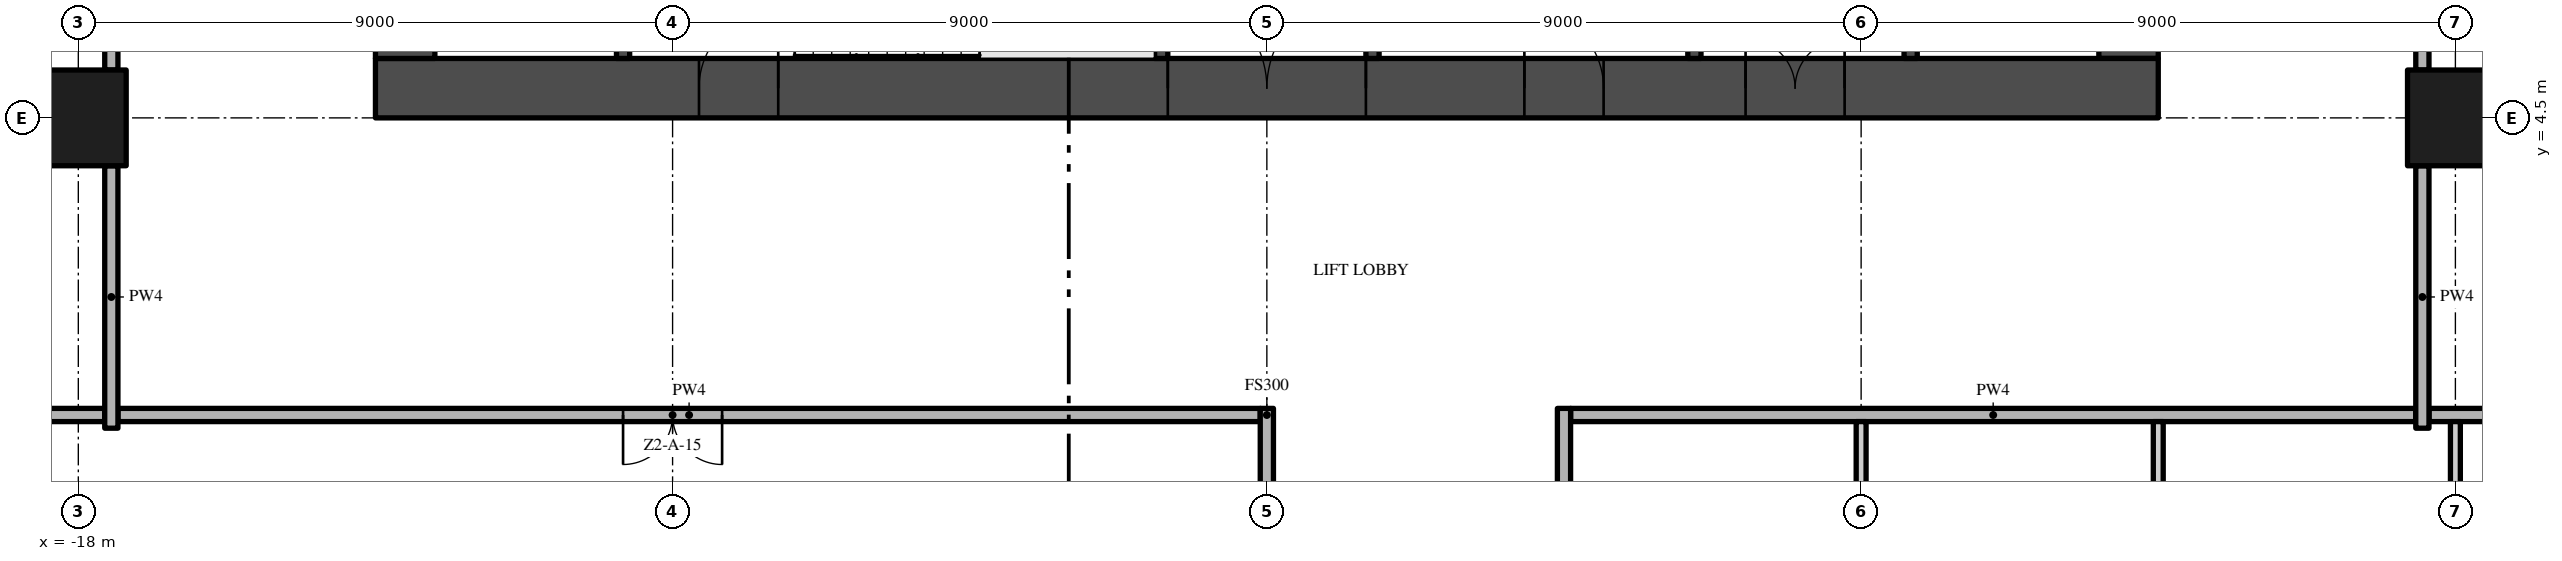
"""IFC4 building model, lengths in metres.
Left out: names, types, materials, properties, quantities, classifications, styles, units other than length and angle.
Written with IfcOpenShell. Run it as: python <this file> out.ifc"""

import sys

from ifc_helpers import new_model, si_unit, direction, frame, frame_2d, origin, origin_2d, place, context, subcontext, project, spatial, rectangle, extrude, element, fill, save


model = new_model("IFC4")
c1 = context("Model", 3, precision=1e-05, world=origin(), true_north=direction((0.0, 1.0)))
c2 = subcontext(c1, "Body", "Model", "MODEL_VIEW")
j1 = project(units=[si_unit("LENGTHUNIT", "METRE"), si_unit("PLANEANGLEUNIT", "RADIAN")], contexts=[c1])
p1 = place(None, origin())
s1 = spatial("IfcSite", under=j1, at=p1, CompositionType="ELEMENT")
p2 = place(p1, origin())
s2 = spatial("IfcBuilding", under=s1, at=p2, CompositionType="ELEMENT")
p3 = place(p2, frame((0.0, 0.0, 77.0)))
s3 = spatial("IfcBuildingStorey", under=s2, at=p3, CompositionType="ELEMENT", Elevation=77.0)
p4 = place(p3, frame((-13.5, 4.95, -0.3), z_axis=(0.0, 0.0, 1.0), x_axis=(1.0, 0.0, 0.0)))
e1 = element("IfcWall", 1, at=p4, inside=s3, PredefinedType="SHEAR", context=c2, shape_type="SweptSolid", body=[
    extrude(rectangle(XDim=27.0, YDim=0.9, at=frame_2d((13.5, 0.0))), origin(), (0.0, 0.0, 1.0), 3.8),
])
p5 = place(p4, frame((12.0, 0.0, 0.3)))
e2 = element("IfcOpeningElement", 2, at=p5, cuts=e1, PredefinedType="OPENING", context=c2, shape_type="SweptSolid", body=[
    extrude(rectangle(XDim=3.0, YDim=2.4, at=frame_2d((1.5, 1.2))), frame((0.0, 0.46, 0.0), z_axis=(0.0, -1.0, 0.0), x_axis=(1.0, 0.0, 0.0)), (0.0, 0.0, 1.0), 0.92),
])
p6 = place(p4, frame((4.9, 0.0, 0.3)))
e3 = element("IfcOpeningElement", 3, at=p6, cuts=e1, PredefinedType="OPENING", context=c2, shape_type="SweptSolid", body=[
    extrude(rectangle(XDim=1.2, YDim=2.2, at=frame_2d((0.6, 1.1))), frame((0.0, 0.46, 0.0), z_axis=(0.0, -1.0, 0.0), x_axis=(1.0, 0.0, 0.0)), (0.0, 0.0, 1.0), 0.92),
])
p7 = place(p4, frame((20.75, 0.0, 0.3)))
e4 = element("IfcOpeningElement", 4, at=p7, cuts=e1, PredefinedType="OPENING", context=c2, shape_type="SweptSolid", body=[
    extrude(rectangle(XDim=1.5, YDim=2.2, at=frame_2d((0.75, 1.1))), frame((0.0, 0.46, 0.0), z_axis=(0.0, -1.0, 0.0), x_axis=(1.0, 0.0, 0.0)), (0.0, 0.0, 1.0), 0.92),
])
p8 = place(p4, frame((17.4, 0.0, 0.3)))
e5 = element("IfcOpeningElement", 5, at=p8, cuts=e1, PredefinedType="OPENING", context=c2, shape_type="SweptSolid", body=[
    extrude(rectangle(XDim=1.2, YDim=2.2, at=frame_2d((0.6, 1.1))), frame((0.0, 0.46, 0.0), z_axis=(0.0, -1.0, 0.0), x_axis=(1.0, 0.0, 0.0)), (0.0, 0.0, 1.0), 0.92),
])
p9 = place(p3, frame((13.05, 5.4, -0.3), z_axis=(0.0, 0.0, 1.0), x_axis=(0.0, 1.0, 0.0)))
e6 = element("IfcWall", 6, at=p9, inside=s3, PredefinedType="SHEAR", context=c2, shape_type="SweptSolid", body=[
    extrude(rectangle(XDim=16.2, YDim=0.9, at=frame_2d((8.1, 0.0))), origin(), (0.0, 0.0, 1.0), 3.8),
])
p10 = place(p9, frame((6.0, 0.0, 0.3)))
e7 = element("IfcOpeningElement", 7, at=p10, cuts=e6, PredefinedType="OPENING", context=c2, shape_type="SweptSolid", body=[
    extrude(rectangle(XDim=1.2, YDim=2.2, at=frame_2d((0.6, 1.1))), frame((0.0, 0.46, 0.0), z_axis=(0.0, -1.0, 0.0), x_axis=(1.0, 0.0, 0.0)), (0.0, 0.0, 1.0), 0.92),
])
p11 = place(p3, frame((-13.05, 21.6, -0.3), z_axis=(0.0, 0.0, 1.0), x_axis=(0.0, -1.0, 0.0)))
e8 = element("IfcWall", 8, at=p11, inside=s3, PredefinedType="SHEAR", context=c2, shape_type="SweptSolid", body=[
    extrude(rectangle(XDim=16.2, YDim=0.9, at=frame_2d((8.1, 0.0))), origin(), (0.0, 0.0, 1.0), 3.8),
])
p12 = place(p11, frame((9.0, 0.0, 0.3)))
e9 = element("IfcOpeningElement", 9, at=p12, cuts=e8, PredefinedType="OPENING", context=c2, shape_type="SweptSolid", body=[
    extrude(rectangle(XDim=1.2, YDim=2.2, at=frame_2d((0.6, 1.1))), frame((0.0, 0.46, 0.0), z_axis=(0.0, -1.0, 0.0), x_axis=(1.0, 0.0, 0.0)), (0.0, 0.0, 1.0), 0.92),
])
for number, where, z_axis, x_axis in (
    (10, (-18.0, 4.5, 0.0), (0.0, 0.0, 1.0), (1.0, 0.0, 0.0)),
    (11, (18.0, 4.5, 0.0), (0.0, 0.0, 1.0), (1.0, 0.0, 0.0)),
):
    element("IfcColumn", number, at=place(p3, frame(where, z_axis=z_axis, x_axis=x_axis)), inside=s3, PredefinedType="COLUMN", context=c2, shape_type="SweptSolid", body=[
        extrude(rectangle(XDim=1.45, YDim=1.45, at=origin_2d()), origin(), (0.0, 0.0, 1.0), 3.5),
    ])
for number, where, z_axis, x_axis in (
    (12, (-9.75, 5.4, 0.0), (0.0, 0.0, 1.0), (0.0, 1.0, 0.0)),
    (13, (-1.6, 5.4, 0.0), (0.0, 0.0, 1.0), (0.0, 1.0, 0.0)),
):
    element("IfcWall", number, at=place(p3, frame(where, z_axis=z_axis, x_axis=x_axis)), inside=s3, PredefinedType="SHEAR", context=c2, shape_type="SweptSolid", body=[
        extrude(rectangle(XDim=2.55, YDim=0.2, at=frame_2d((1.275, 0.0))), origin(), (0.0, 0.0, 1.0), 3.5),
    ])
p13 = place(p3, frame((1.6, 11.5, 0.0), z_axis=(0.0, 0.0, 1.0), x_axis=(0.0, -1.0, 0.0)))
e14 = element("IfcWall", 14, at=p13, inside=s3, PredefinedType="SHEAR", context=c2, shape_type="SweptSolid", body=[
    extrude(rectangle(XDim=6.1, YDim=0.2, at=frame_2d((3.05, 0.0))), origin(), (0.0, 0.0, 1.0), 3.5),
])
p14 = place(p13, frame((2.2, 0.0, 0.0)))
e15 = element("IfcOpeningElement", 15, at=p14, cuts=e14, PredefinedType="OPENING", context=c2, shape_type="SweptSolid", body=[
    extrude(rectangle(XDim=0.9, YDim=2.1, at=frame_2d((0.45, 1.05))), frame((0.0, 0.11, 0.0), z_axis=(0.0, -1.0, 0.0), x_axis=(1.0, 0.0, 0.0)), (0.0, 0.0, 1.0), 0.22),
])
p15 = place(p3, frame((6.475, 5.4, 0.0), z_axis=(0.0, 0.0, 1.0), x_axis=(0.0, 1.0, 0.0)))
e16 = element("IfcWall", 16, at=p15, inside=s3, PredefinedType="SHEAR", context=c2, shape_type="SweptSolid", body=[
    extrude(rectangle(XDim=6.1, YDim=0.2, at=frame_2d((3.05, 0.0))), origin(), (0.0, 0.0, 1.0), 3.5),
])
p16 = place(p3, frame((9.75, 5.4, 0.0), z_axis=(0.0, 0.0, 1.0), x_axis=(0.0, 1.0, 0.0)))
e17 = element("IfcWall", 17, at=p16, inside=s3, PredefinedType="SHEAR", context=c2, shape_type="SweptSolid", body=[
    extrude(rectangle(XDim=2.2, YDim=0.2, at=frame_2d((1.1, 0.0))), origin(), (0.0, 0.0, 1.0), 3.5),
])
p17 = place(p16, frame((0.55, 0.0, 0.0)))
e18 = element("IfcOpeningElement", 18, at=p17, cuts=e17, PredefinedType="OPENING", context=c2, shape_type="SweptSolid", body=[
    extrude(rectangle(XDim=1.1, YDim=2.1, at=frame_2d((0.55, 1.05))), frame((0.0, 0.11, 0.0), z_axis=(0.0, -1.0, 0.0), x_axis=(1.0, 0.0, 0.0)), (0.0, 0.0, 1.0), 0.22),
])
p18 = place(p3, frame((-0.1, 0.0, 0.0), z_axis=(0.0, 0.0, 1.0), x_axis=(-1.0, 0.0, 0.0)))
e19 = element("IfcWall", 19, at=p18, inside=s3, PredefinedType="PARTITIONING", context=c2, shape_type="SweptSolid", body=[
    extrude(rectangle(XDim=17.3, YDim=0.2, at=frame_2d((8.65, 0.0))), origin(), (0.0, 0.0, 1.0), 3.5),
])
p19 = place(p18, frame((8.15, 0.0, 0.0)))
e20 = element("IfcOpeningElement", 20, at=p19, cuts=e19, PredefinedType="OPENING", context=c2, shape_type="SweptSolid", body=[
    extrude(rectangle(XDim=1.5, YDim=2.4, at=frame_2d((0.75, 1.2))), frame((0.0, 0.11, 0.0), z_axis=(0.0, -1.0, 0.0), x_axis=(1.0, 0.0, 0.0)), (0.0, 0.0, 1.0), 0.22),
])
p20 = place(p3, frame((4.6, 0.0, 0.0), z_axis=(0.0, 0.0, 1.0), x_axis=(1.0, 0.0, 0.0)))
e21 = element("IfcWall", 21, at=p20, inside=s3, PredefinedType="PARTITIONING", context=c2, shape_type="SweptSolid", body=[
    extrude(rectangle(XDim=12.8, YDim=0.2, at=frame_2d((6.4, 0.0))), origin(), (0.0, 0.0, 1.0), 3.5),
])
for number, where, z_axis, x_axis in (
    (22, (-26.7, 0.0, 0.0), (0.0, 0.0, 1.0), (1.0, 0.0, 0.0)),
    (23, (17.6, 0.0, 0.0), (0.0, 0.0, 1.0), (1.0, 0.0, 0.0)),
):
    element("IfcWall", number, at=place(p3, frame(where, z_axis=z_axis, x_axis=x_axis)), inside=s3, PredefinedType="PARTITIONING", context=c2, shape_type="SweptSolid", body=[
        extrude(rectangle(XDim=9.1, YDim=0.2, at=frame_2d((4.55, 0.0))), origin(), (0.0, 0.0, 1.0), 3.5),
    ])
p21 = place(p3, frame((-17.5, -0.2, 0.0), z_axis=(0.0, 0.0, 1.0), x_axis=(0.0, 1.0, 0.0)))
e24 = element("IfcWall", 24, at=p21, inside=s3, PredefinedType="PARTITIONING", context=c2, shape_type="SweptSolid", body=[
    extrude(rectangle(XDim=3.975, YDim=0.2, at=frame_2d((1.988, 0.0))), origin(), (0.0, 0.0, 1.0), 3.5),
])
p22 = place(p3, frame((-17.5, 5.225, 0.0), z_axis=(0.0, 0.0, 1.0), x_axis=(0.0, 1.0, 0.0)))
e25 = element("IfcWall", 25, at=p22, inside=s3, PredefinedType="PARTITIONING", context=c2, shape_type="SweptSolid", body=[
    extrude(rectangle(XDim=7.55, YDim=0.2, at=frame_2d((3.775, 0.0))), origin(), (0.0, 0.0, 1.0), 3.5),
])
p23 = place(p3, frame((0.0, -3.775, 0.0), z_axis=(0.0, 0.0, 1.0), x_axis=(0.0, 1.0, 0.0)))
e26 = element("IfcWall", 26, at=p23, inside=s3, PredefinedType="PARTITIONING", context=c2, shape_type="SweptSolid", body=[
    extrude(rectangle(XDim=3.875, YDim=0.2, at=frame_2d((1.938, 0.0))), origin(), (0.0, 0.0, 1.0), 3.5),
])
p24 = place(p3, frame((4.5, 0.1, 0.0), z_axis=(0.0, 0.0, 1.0), x_axis=(0.0, -1.0, 0.0)))
e27 = element("IfcWall", 27, at=p24, inside=s3, PredefinedType="PARTITIONING", context=c2, shape_type="SweptSolid", body=[
    extrude(rectangle(XDim=22.3, YDim=0.2, at=frame_2d((11.15, 0.0))), origin(), (0.0, 0.0, 1.0), 3.5),
])
p25 = place(p24, frame((10.6, 0.0, 0.0)))
e28 = element("IfcOpeningElement", 28, at=p25, cuts=e27, PredefinedType="OPENING", context=c2, shape_type="SweptSolid", body=[
    extrude(rectangle(XDim=1.5, YDim=2.4, at=frame_2d((0.75, 1.2))), frame((0.0, 0.11, 0.0), z_axis=(0.0, -1.0, 0.0), x_axis=(1.0, 0.0, 0.0)), (0.0, 0.0, 1.0), 0.22),
])
p26 = place(p3, frame((9.0, -0.1, 0.0), z_axis=(0.0, 0.0, 1.0), x_axis=(0.0, -1.0, 0.0)))
e29 = element("IfcWall", 29, at=p26, inside=s3, PredefinedType="PARTITIONING", context=c2, shape_type="SweptSolid", body=[
    extrude(rectangle(XDim=3.675, YDim=0.15, at=frame_2d((1.837, 0.0))), origin(), (0.0, 0.0, 1.0), 3.5),
])
p27 = place(p26, frame((0.95, 0.0, 0.0)))
e30 = element("IfcOpeningElement", 30, at=p27, cuts=e29, PredefinedType="OPENING", context=c2, shape_type="SweptSolid", body=[
    extrude(rectangle(XDim=0.9, YDim=2.1, at=frame_2d((0.45, 1.05))), frame((0.0, 0.085, 0.0), z_axis=(0.0, -1.0, 0.0), x_axis=(1.0, 0.0, 0.0)), (0.0, 0.0, 1.0), 0.17),
])
p28 = place(p3, frame((13.5, -6.075, 0.0), z_axis=(0.0, 0.0, 1.0), x_axis=(0.0, 1.0, 0.0)))
e31 = element("IfcWall", 31, at=p28, inside=s3, PredefinedType="PARTITIONING", context=c2, shape_type="SweptSolid", body=[
    extrude(rectangle(XDim=5.975, YDim=0.15, at=frame_2d((2.987, 0.0))), origin(), (0.0, 0.0, 1.0), 3.5),
])
p29 = place(p28, frame((1.175, 0.0, 0.0)))
e32 = element("IfcOpeningElement", 32, at=p29, cuts=e31, PredefinedType="OPENING", context=c2, shape_type="SweptSolid", body=[
    extrude(rectangle(XDim=0.8, YDim=2.0, at=frame_2d((0.4, 1.0))), frame((0.0, 0.085, 0.0), z_axis=(0.0, -1.0, 0.0), x_axis=(1.0, 0.0, 0.0)), (0.0, 0.0, 1.0), 0.17),
])
p30 = place(p3, frame((17.5, -0.2, 0.0), z_axis=(0.0, 0.0, 1.0), x_axis=(0.0, 1.0, 0.0)))
e33 = element("IfcWall", 33, at=p30, inside=s3, PredefinedType="PARTITIONING", context=c2, shape_type="SweptSolid", body=[
    extrude(rectangle(XDim=3.975, YDim=0.2, at=frame_2d((1.988, 0.0))), origin(), (0.0, 0.0, 1.0), 3.5),
])
p31 = place(p3, frame((17.5, 12.775, 0.0), z_axis=(0.0, 0.0, 1.0), x_axis=(0.0, -1.0, 0.0)))
e34 = element("IfcWall", 34, at=p31, inside=s3, PredefinedType="PARTITIONING", context=c2, shape_type="SweptSolid", body=[
    extrude(rectangle(XDim=7.55, YDim=0.2, at=frame_2d((3.775, 0.0))), origin(), (0.0, 0.0, 1.0), 3.5),
])
p32 = place(p31, frame((3.175, 0.0, 0.0)))
e35 = element("IfcOpeningElement", 35, at=p32, cuts=e34, PredefinedType="OPENING", context=c2, shape_type="SweptSolid", body=[
    extrude(rectangle(XDim=1.2, YDim=2.4, at=frame_2d((0.6, 1.2))), frame((0.0, 0.11, 0.0), z_axis=(0.0, -1.0, 0.0), x_axis=(1.0, 0.0, 0.0)), (0.0, 0.0, 1.0), 0.22),
])
p33 = place(p3, frame((18.0, -0.1, 0.0), z_axis=(0.0, 0.0, 1.0), x_axis=(0.0, -1.0, 0.0)))
e36 = element("IfcWall", 36, at=p33, inside=s3, PredefinedType="PARTITIONING", context=c2, shape_type="SweptSolid", body=[
    extrude(rectangle(XDim=3.675, YDim=0.15, at=frame_2d((1.837, 0.0))), origin(), (0.0, 0.0, 1.0), 3.5),
])
p34 = place(p33, frame((1.675, 0.0, 0.0)))
e37 = element("IfcOpeningElement", 37, at=p34, cuts=e36, PredefinedType="OPENING", context=c2, shape_type="SweptSolid", body=[
    extrude(rectangle(XDim=1.0, YDim=2.4, at=frame_2d((0.5, 1.2))), frame((0.0, 0.085, 0.0), z_axis=(0.0, -1.0, 0.0), x_axis=(1.0, 0.0, 0.0)), (0.0, 0.0, 1.0), 0.17),
])
p35 = place(p5, frame((3.0, 0.0, 0.0), z_axis=(0.0, 0.0, 1.0), x_axis=(-1.0, 0.0, 0.0)))
e38 = element("IfcDoor", 38, at=p35, inside=s3, OperationType="DOUBLE_DOOR_SINGLE_SWING", PredefinedType="DOOR", context=c2, shape_type="SweptSolid", body=[
    extrude(rectangle(XDim=3.0, YDim=2.4, at=frame_2d((1.5, 1.2))), frame((0.0, 0.025, 0.0), z_axis=(0.0, -1.0, 0.0), x_axis=(1.0, 0.0, 0.0)), (0.0, 0.0, 1.0), 0.05),
])
fill(e2, e38)
p36 = place(p6, frame((1.2, 0.0, 0.0), z_axis=(0.0, 0.0, 1.0), x_axis=(-1.0, 0.0, 0.0)))
e39 = element("IfcDoor", 39, at=p36, inside=s3, OperationType="SINGLE_SWING_LEFT", PredefinedType="DOOR", context=c2, shape_type="SweptSolid", body=[
    extrude(rectangle(XDim=1.2, YDim=2.2, at=frame_2d((0.6, 1.1))), frame((0.0, 0.025, 0.0), z_axis=(0.0, -1.0, 0.0), x_axis=(1.0, 0.0, 0.0)), (0.0, 0.0, 1.0), 0.05),
])
fill(e3, e39)
p37 = place(p7, frame((1.5, 0.0, 0.0), z_axis=(0.0, 0.0, 1.0), x_axis=(-1.0, 0.0, 0.0)))
e40 = element("IfcDoor", 40, at=p37, inside=s3, OperationType="DOUBLE_DOOR_SINGLE_SWING", PredefinedType="DOOR", context=c2, shape_type="SweptSolid", body=[
    extrude(rectangle(XDim=1.5, YDim=2.2, at=frame_2d((0.75, 1.1))), frame((0.0, 0.025, 0.0), z_axis=(0.0, -1.0, 0.0), x_axis=(1.0, 0.0, 0.0)), (0.0, 0.0, 1.0), 0.05),
])
fill(e4, e40)
p38 = place(p8, frame((1.2, 0.0, 0.0), z_axis=(0.0, 0.0, 1.0), x_axis=(-1.0, 0.0, 0.0)))
e41 = element("IfcDoor", 41, at=p38, inside=s3, OperationType="SINGLE_SWING_RIGHT", PredefinedType="DOOR", context=c2, shape_type="SweptSolid", body=[
    extrude(rectangle(XDim=1.2, YDim=2.2, at=frame_2d((0.6, 1.1))), frame((0.0, 0.025, 0.0), z_axis=(0.0, -1.0, 0.0), x_axis=(1.0, 0.0, 0.0)), (0.0, 0.0, 1.0), 0.05),
])
fill(e5, e41)
p39 = place(p19, origin())
e42 = element("IfcDoor", 42, at=p39, inside=s3, OperationType="DOUBLE_DOOR_SINGLE_SWING", PredefinedType="DOOR", context=c2, shape_type="SweptSolid", body=[
    extrude(rectangle(XDim=1.5, YDim=2.4, at=frame_2d((0.75, 1.2))), frame((0.0, 0.025, 0.0), z_axis=(0.0, -1.0, 0.0), x_axis=(1.0, 0.0, 0.0)), (0.0, 0.0, 1.0), 0.05),
])
fill(e20, e42)
save(model, sys.argv[1])
